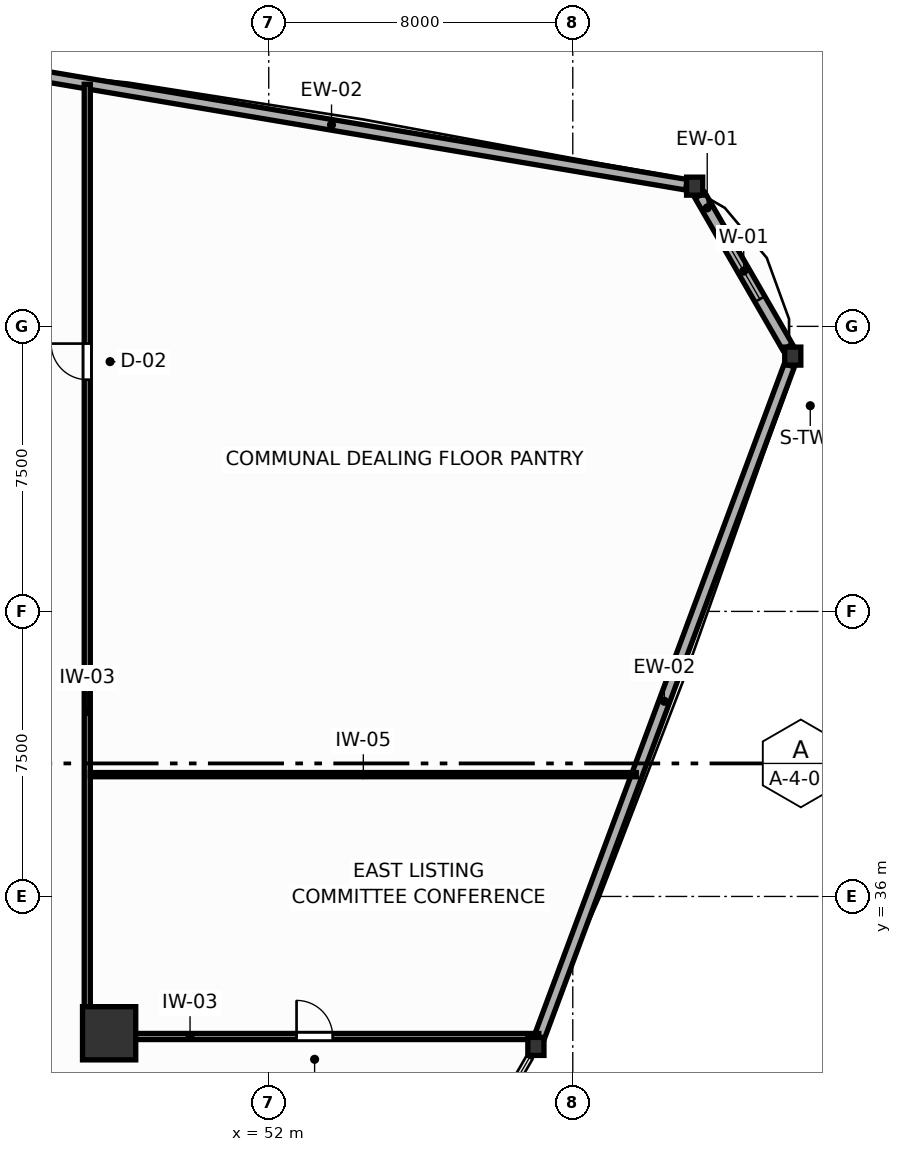
"""IFC4 building model, lengths in metres.
Left out: names, types, materials, properties, quantities, classifications, styles, units other than length and angle.
Written with IfcOpenShell. Run it as: python <this file> out.ifc"""

import sys

from ifc_helpers import new_model, si_unit, direction, frame, frame_2d, origin, origin_2d, place, context, subcontext, project, spatial, rectangle, i_section, extrude, source, transform, mapped, element, fill, save


model = new_model("IFC4")
c1 = context("Model", 3, precision=1e-05, world=origin(), true_north=direction((0.0, 1.0)))
c2 = subcontext(c1, "Body", "Model", "MODEL_VIEW")
j1 = project(units=[si_unit("LENGTHUNIT", "METRE"), si_unit("PLANEANGLEUNIT", "RADIAN")], contexts=[c1])
p1 = place(None, origin())
s1 = spatial("IfcSite", under=j1, at=p1, CompositionType="ELEMENT")
p2 = place(p1, origin())
s2 = spatial("IfcBuilding", under=s1, at=p2, CompositionType="ELEMENT")
p3 = place(p2, frame((0.0, 0.0, 24.0)))
s3 = spatial("IfcBuildingStorey", under=s2, at=p3, CompositionType="ELEMENT", Elevation=24.0)
m1 = source(origin(), c2, "Body", "SweptSolid", [
    extrude(rectangle(XDim=1.4, YDim=1.4, at=origin_2d()), origin(), (0.0, 0.0, 1.0), 3.9),
])
p4 = place(p3, frame((47.8, 32.4, 0.0), z_axis=(0.0, 0.0, 1.0), x_axis=(1.0, 0.0, 0.0)))
e1 = element("IfcColumn", 1, at=p4, inside=s3, PredefinedType="COLUMN", context=c2, shape_type="MappedRepresentation", body=[
    mapped(m1, transform((0.0, 0.0, 0.0), scale=1.0)),
])
m2 = source(origin(), c2, "Body", "SweptSolid", [
    extrude(i_section(OverallWidth=0.424, OverallDepth=0.474, WebThickness=0.045, FlangeThickness=0.072, FilletRadius=0.015, at=origin_2d()), origin(), (0.0, 0.0, 1.0), 3.9),
])
for number, where, z_axis, x_axis in (
    (2, (65.789, 50.217, 0.0), (0.0, 0.0, 1.0), (1.0, 0.0, 0.0)),
    (3, (63.207, 54.689, 0.0), (0.0, 0.0, 1.0), (1.0, 0.0, 0.0)),
    (4, (59.03, 32.054, 0.0), (0.0, 0.0, 1.0), (1.0, 0.0, 0.0)),
):
    element("IfcColumn", number, at=place(p3, frame(where, z_axis=z_axis, x_axis=x_axis)), inside=s3, PredefinedType="COLUMN", context=c2, shape_type="MappedRepresentation", body=[
        mapped(m2, transform((0.0, 0.0, 0.0), scale=1.0)),
    ])
p5 = place(p3, frame((65.649, 50.459, 0.0), z_axis=(0.0, 0.0, 1.0), x_axis=(-0.500022295776, 0.86601253093, 0.0)))
e5 = element("IfcWall", 5, at=p5, inside=s3, PredefinedType="SOLIDWALL", context=c2, shape_type="SweptSolid", body=[
    extrude(rectangle(XDim=4.605, YDim=0.3, at=frame_2d((2.302, 0.0))), origin(), (0.0, 0.0, 1.0), 3.23),
])
p6 = place(p5, frame((1.452, 0.0, 0.75)))
e6 = element("IfcOpeningElement", 6, at=p6, cuts=e5, PredefinedType="OPENING", context=c2, shape_type="SweptSolid", body=[
    extrude(rectangle(XDim=1.7, YDim=1.75, at=frame_2d((0.85, 0.875))), frame((0.0, 0.16, 0.0), z_axis=(0.0, -1.0, 0.0), x_axis=(1.0, 0.0, 0.0)), (0.0, 0.0, 1.0), 0.32),
])
p7 = place(p3, frame((62.99, 54.726, 0.0), z_axis=(0.0, 0.0, 1.0), x_axis=(-0.98603202958, 0.166555806393, 0.0)))
e7 = element("IfcWall", 7, at=p7, inside=s3, PredefinedType="SOLIDWALL", context=c2, shape_type="SweptSolid", body=[
    extrude(rectangle(XDim=18.94, YDim=0.28, at=frame_2d((9.47, 0.0))), origin(), (0.0, 0.0, 1.0), 3.23),
])
p8 = place(p3, frame((59.12, 32.296, 0.0), z_axis=(0.0, 0.0, 1.0), x_axis=(0.348763587367, 0.937210734108, 0.0)))
e8 = element("IfcWall", 8, at=p8, inside=s3, PredefinedType="SOLIDWALL", context=c2, shape_type="SweptSolid", body=[
    extrude(rectangle(XDim=18.863, YDim=0.28, at=frame_2d((9.432, 0.0))), origin(), (0.0, 0.0, 1.0), 3.23),
])
p9 = place(p3, frame((47.225, 32.31, 0.0), z_axis=(0.0, 0.0, 1.0), x_axis=(0.0, 1.0, 0.0)))
e9 = element("IfcWall", 9, at=p9, inside=s3, PredefinedType="PARTITIONING", context=c2, shape_type="SweptSolid", body=[
    extrude(rectangle(XDim=25.059, YDim=0.16, at=frame_2d((12.529, 0.0))), origin(), (0.0, 0.0, 1.0), 3.68),
])
p10 = place(p9, frame((17.287, 0.0, 0.0)))
e10 = element("IfcOpeningElement", 10, at=p10, cuts=e9, PredefinedType="OPENING", context=c2, shape_type="SweptSolid", body=[
    extrude(rectangle(XDim=0.95, YDim=2.05, at=frame_2d((0.475, 1.025))), frame((0.0, 0.09, 0.0), z_axis=(0.0, -1.0, 0.0), x_axis=(1.0, 0.0, 0.0)), (0.0, 0.0, 1.0), 0.18),
])
p11 = place(p3, frame((47.307, 32.315, 0.0), z_axis=(0.0, 0.0, 1.0), x_axis=(1.0, 0.0, 0.0)))
e11 = element("IfcWall", 11, at=p11, inside=s3, PredefinedType="PARTITIONING", context=c2, shape_type="SweptSolid", body=[
    extrude(rectangle(XDim=11.8, YDim=0.16, at=frame_2d((5.9, 0.0))), origin(), (0.0, 0.0, 1.0), 3.18),
])
p12 = place(p11, frame((5.425, 0.0, 0.0)))
e12 = element("IfcOpeningElement", 12, at=p12, cuts=e11, PredefinedType="OPENING", context=c2, shape_type="SweptSolid", body=[
    extrude(rectangle(XDim=0.95, YDim=2.05, at=frame_2d((0.475, 1.025))), frame((0.0, 0.09, 0.0), z_axis=(0.0, -1.0, 0.0), x_axis=(1.0, 0.0, 0.0)), (0.0, 0.0, 1.0), 0.18),
])
p13 = place(p3, frame((47.307, 39.205, 0.0), z_axis=(0.0, 0.0, 1.0), x_axis=(1.0, 0.0, 0.0)))
e13 = element("IfcWall", 13, at=p13, inside=s3, PredefinedType="MOVABLE", context=c2, shape_type="SweptSolid", body=[
    extrude(rectangle(XDim=14.364, YDim=0.11, at=frame_2d((7.182, 0.0))), origin(), (0.0, 0.0, 1.0), 3.68),
])
p14 = place(p6, origin())
e14 = element("IfcWindow", 14, at=p14, inside=s3, PartitioningType="SINGLE_PANEL", PredefinedType="WINDOW", context=c2, shape_type="SweptSolid", body=[
    extrude(rectangle(XDim=1.7, YDim=1.75, at=frame_2d((0.85, 0.875))), frame((0.0, 0.03, 0.0), z_axis=(0.0, -1.0, 0.0), x_axis=(1.0, 0.0, 0.0)), (0.0, 0.0, 1.0), 0.06),
])
fill(e6, e14)
p15 = place(p10, origin())
e15 = element("IfcDoor", 15, at=p15, inside=s3, OperationType="SINGLE_SWING_RIGHT", PredefinedType="DOOR", context=c2, shape_type="SweptSolid", body=[
    extrude(rectangle(XDim=0.95, YDim=2.05, at=frame_2d((0.475, 1.025))), frame((0.0, 0.025, 0.0), z_axis=(0.0, -1.0, 0.0), x_axis=(1.0, 0.0, 0.0)), (0.0, 0.0, 1.0), 0.05),
])
fill(e10, e15)
p16 = place(p12, origin())
e16 = element("IfcDoor", 16, at=p16, inside=s3, OperationType="SINGLE_SWING_LEFT", PredefinedType="DOOR", context=c2, shape_type="SweptSolid", body=[
    extrude(rectangle(XDim=0.95, YDim=2.05, at=frame_2d((0.475, 1.025))), frame((0.0, 0.025, 0.0), z_axis=(0.0, -1.0, 0.0), x_axis=(1.0, 0.0, 0.0)), (0.0, 0.0, 1.0), 0.05),
])
fill(e12, e16)
save(model, sys.argv[1])
